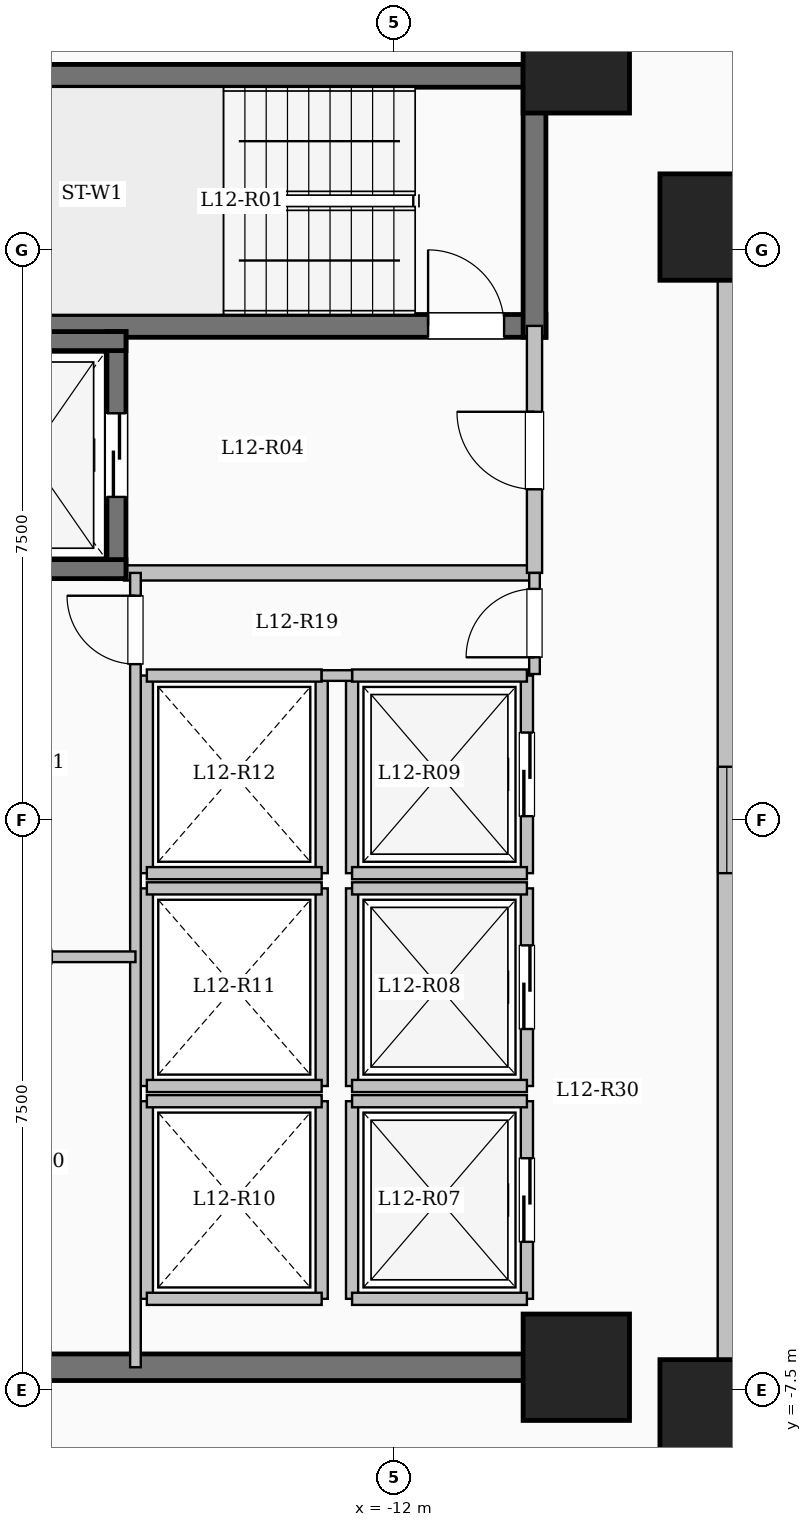
"""IFC4 building model, lengths in metres.
Left out: names, types, materials, properties, quantities, classifications, styles, units other than length and angle.
Written with IfcOpenShell. Run it as: python <this file> out.ifc"""

import sys

from ifc_helpers import new_model, si_unit, direction, frame, frame_2d, origin, origin_2d, place, context, subcontext, project, spatial, rectangle, extrude, element, fill, save


model = new_model("IFC4")
c1 = context("Model", 3, precision=1e-05, world=origin(), true_north=direction((0.0, 1.0)))
c2 = subcontext(c1, "Body", "Model", "MODEL_VIEW")
j1 = project(units=[si_unit("LENGTHUNIT", "METRE"), si_unit("PLANEANGLEUNIT", "RADIAN")], contexts=[c1])
p1 = place(None, origin())
s1 = spatial("IfcSite", under=j1, at=p1, CompositionType="ELEMENT")
p2 = place(p1, origin())
s2 = spatial("IfcBuilding", under=s1, at=p2, CompositionType="ELEMENT")
p3 = place(p2, frame((0.0, 0.0, 47.45)))
s3 = spatial("IfcBuildingStorey", under=s2, at=p3, CompositionType="ELEMENT", Elevation=47.45)
for number, where, z_axis, x_axis in (
    (1, (-7.8, -7.8, 0.0), (0.0, 0.0, 1.0), (1.0, 0.0, 0.0)),
    (2, (-7.8, 7.8, 0.0), (0.0, 0.0, 1.0), (1.0, 0.0, 0.0)),
    (3, (-9.6, -7.2, 0.0), (0.0, 0.0, 1.0), (1.0, 0.0, 0.0)),
    (4, (-9.6, 10.0, 0.0), (0.0, 0.0, 1.0), (1.0, 0.0, 0.0)),
):
    element("IfcColumn", number, at=place(p3, frame(where, z_axis=z_axis, x_axis=x_axis)), inside=s3, PredefinedType="COLUMN", context=c2, shape_type="SweptSolid", body=[
        extrude(rectangle(XDim=1.4, YDim=1.4, at=origin_2d()), origin(), (0.0, 0.0, 1.0), 3.35),
    ])
p4 = place(p3, frame((-7.62, -7.62, 0.0), z_axis=(0.0, 0.0, 1.0), x_axis=(1.0, 0.0, 0.0)))
e5 = element("IfcWall", 5, at=p4, inside=s3, PredefinedType="SOLIDWALL", context=c2, shape_type="SweptSolid", body=[
    extrude(rectangle(XDim=15.24, YDim=0.24, at=frame_2d((7.62, 0.0))), origin(), (0.0, 0.0, 1.0), 3.1),
])
p5 = place(p4, frame((6.92, 0.0, 0.95)))
e6 = element("IfcOpeningElement", 6, at=p5, cuts=e5, PredefinedType="OPENING", context=c2, shape_type="SweptSolid", body=[
    extrude(rectangle(XDim=1.4, YDim=1.5, at=frame_2d((0.7, 0.75))), frame((0.0, 0.13, 0.0), z_axis=(0.0, -1.0, 0.0), x_axis=(1.0, 0.0, 0.0)), (0.0, 0.0, 1.0), 0.26),
])
p6 = place(p3, frame((7.62, 7.62, 0.0), z_axis=(0.0, 0.0, 1.0), x_axis=(-1.0, 0.0, 0.0)))
e7 = element("IfcWall", 7, at=p6, inside=s3, PredefinedType="SOLIDWALL", context=c2, shape_type="SweptSolid", body=[
    extrude(rectangle(XDim=15.24, YDim=0.24, at=frame_2d((7.62, 0.0))), origin(), (0.0, 0.0, 1.0), 3.1),
])
p7 = place(p6, frame((6.92, 0.0, 0.95)))
e8 = element("IfcOpeningElement", 8, at=p7, cuts=e7, PredefinedType="OPENING", context=c2, shape_type="SweptSolid", body=[
    extrude(rectangle(XDim=1.4, YDim=1.5, at=frame_2d((0.7, 0.75))), frame((0.0, 0.13, 0.0), z_axis=(0.0, -1.0, 0.0), x_axis=(1.0, 0.0, 0.0)), (0.0, 0.0, 1.0), 0.26),
])
p8 = place(p3, frame((-7.62, 7.62, 0.0), z_axis=(0.0, 0.0, 1.0), x_axis=(0.0, -1.0, 0.0)))
e9 = element("IfcWall", 9, at=p8, inside=s3, PredefinedType="SOLIDWALL", context=c2, shape_type="SweptSolid", body=[
    extrude(rectangle(XDim=15.24, YDim=0.24, at=frame_2d((7.62, 0.0))), origin(), (0.0, 0.0, 1.0), 3.1),
])
p9 = place(p8, frame((6.92, 0.0, 0.95)))
e10 = element("IfcOpeningElement", 10, at=p9, cuts=e9, PredefinedType="OPENING", context=c2, shape_type="SweptSolid", body=[
    extrude(rectangle(XDim=1.4, YDim=1.5, at=frame_2d((0.7, 0.75))), frame((0.0, 0.13, 0.0), z_axis=(0.0, -1.0, 0.0), x_axis=(1.0, 0.0, 0.0)), (0.0, 0.0, 1.0), 0.26),
])
p10 = place(p3, frame((-18.0, 9.79, 0.0), z_axis=(0.0, 0.0, 1.0), x_axis=(1.0, 0.0, 0.0)))
e11 = element("IfcWall", 11, at=p10, inside=s3, PredefinedType="SHEAR", context=c2, shape_type="SweptSolid", body=[
    extrude(rectangle(XDim=8.0, YDim=0.3, at=frame_2d((4.0, 0.0))), origin(), (0.0, 0.0, 1.0), 3.35),
])
p11 = place(p3, frame((-18.0, 6.5, 0.0), z_axis=(0.0, 0.0, 1.0), x_axis=(1.0, 0.0, 0.0)))
e12 = element("IfcWall", 12, at=p11, inside=s3, PredefinedType="SHEAR", context=c2, shape_type="SweptSolid", body=[
    extrude(rectangle(XDim=8.0, YDim=0.3, at=frame_2d((4.0, 0.0))), origin(), (0.0, 0.0, 1.0), 3.35),
])
p12 = place(p11, frame((6.45, 0.0, 0.0)))
e13 = element("IfcOpeningElement", 13, at=p12, cuts=e12, PredefinedType="OPENING", context=c2, shape_type="SweptSolid", body=[
    extrude(rectangle(XDim=1.0, YDim=2.15, at=frame_2d((0.5, 1.075))), frame((0.0, 0.16, 0.0), z_axis=(0.0, -1.0, 0.0), x_axis=(1.0, 0.0, 0.0)), (0.0, 0.0, 1.0), 0.32),
])
p13 = place(p3, frame((-10.15, 6.35, 0.0), z_axis=(0.0, 0.0, 1.0), x_axis=(0.0, 1.0, 0.0)))
e14 = element("IfcWall", 14, at=p13, inside=s3, PredefinedType="SHEAR", context=c2, shape_type="SweptSolid", body=[
    extrude(rectangle(XDim=3.59, YDim=0.3, at=frame_2d((1.795, 0.0))), origin(), (0.0, 0.0, 1.0), 3.35),
])
p14 = place(p3, frame((-15.55, 3.25, 0.0), z_axis=(0.0, 0.0, 1.0), x_axis=(1.0, 0.0, 0.0)))
e15 = element("IfcWall", 15, at=p14, inside=s3, PredefinedType="SOLIDWALL", context=c2, shape_type="SweptSolid", body=[
    extrude(rectangle(XDim=5.4, YDim=0.2, at=frame_2d((2.7, 0.0))), origin(), (0.0, 0.0, 1.0), 3.1),
])
p15 = place(p3, frame((-10.15, 3.25, 0.0), z_axis=(0.0, 0.0, 1.0), x_axis=(0.0, 1.0, 0.0)))
e16 = element("IfcWall", 16, at=p15, inside=s3, PredefinedType="SOLIDWALL", context=c2, shape_type="SweptSolid", body=[
    extrude(rectangle(XDim=3.25, YDim=0.2, at=frame_2d((1.625, 0.0))), origin(), (0.0, 0.0, 1.0), 3.1),
])
p16 = place(p15, frame((1.1, 0.0, 0.0)))
e17 = element("IfcOpeningElement", 17, at=p16, cuts=e16, PredefinedType="OPENING", context=c2, shape_type="SweptSolid", body=[
    extrude(rectangle(XDim=1.02, YDim=2.15, at=frame_2d((0.51, 1.075))), frame((0.0, 0.11, 0.0), z_axis=(0.0, -1.0, 0.0), x_axis=(1.0, 0.0, 0.0)), (0.0, 0.0, 1.0), 0.22),
])
p17 = place(p3, frame((-15.65, 3.175, 0.0), z_axis=(0.0, 0.0, 1.0), x_axis=(0.0, 1.0, 0.0)))
e18 = element("IfcWall", 18, at=p17, inside=s3, PredefinedType="SHEAR", context=c2, shape_type="SweptSolid", body=[
    extrude(rectangle(XDim=3.25, YDim=0.25, at=frame_2d((1.625, 0.0))), origin(), (0.0, 0.0, 1.0), 3.35),
])
p18 = place(p17, frame((1.075, 0.0, 0.0)))
e19 = element("IfcOpeningElement", 19, at=p18, cuts=e18, PredefinedType="OPENING", context=c2, shape_type="SweptSolid", body=[
    extrude(rectangle(XDim=1.1, YDim=2.15, at=frame_2d((0.55, 1.075))), frame((0.0, 0.135, 0.0), z_axis=(0.0, -1.0, 0.0), x_axis=(1.0, 0.0, 0.0)), (0.0, 0.0, 1.0), 0.27),
])
for number, where, z_axis, x_axis in (
    (20, (-18.075, 3.3, 0.0), (0.0, 0.0, 1.0), (1.0, 0.0, 0.0)),
    (21, (-18.075, 6.3, 0.0), (0.0, 0.0, 1.0), (1.0, 0.0, 0.0)),
):
    element("IfcWall", number, at=place(p3, frame(where, z_axis=z_axis, x_axis=x_axis)), inside=s3, PredefinedType="SHEAR", context=c2, shape_type="SweptSolid", body=[
        extrude(rectangle(XDim=2.55, YDim=0.25, at=frame_2d((1.275, 0.0))), origin(), (0.0, 0.0, 1.0), 3.35),
    ])
p19 = place(p3, frame((-12.55, -6.3, 0.0), z_axis=(0.0, 0.0, 1.0), x_axis=(0.0, 1.0, 0.0)))
e22 = element("IfcWall", 22, at=p19, inside=s3, PredefinedType="SOLIDWALL", context=c2, shape_type="SweptSolid", body=[
    extrude(rectangle(XDim=2.6, YDim=0.16, at=frame_2d((1.3, 0.0))), origin(), (0.0, 0.0, 1.0), 3.1),
])
p20 = place(p3, frame((-10.25, -6.3, 0.0), z_axis=(0.0, 0.0, 1.0), x_axis=(0.0, 1.0, 0.0)))
e23 = element("IfcWall", 23, at=p20, inside=s3, PredefinedType="SOLIDWALL", context=c2, shape_type="SweptSolid", body=[
    extrude(rectangle(XDim=2.6, YDim=0.16, at=frame_2d((1.3, 0.0))), origin(), (0.0, 0.0, 1.0), 3.1),
])
p21 = place(p20, frame((0.75, 0.0, 0.0)))
e24 = element("IfcOpeningElement", 24, at=p21, cuts=e23, PredefinedType="OPENING", context=c2, shape_type="SweptSolid", body=[
    extrude(rectangle(XDim=1.1, YDim=2.15, at=frame_2d((0.55, 1.075))), frame((0.0, 0.09, 0.0), z_axis=(0.0, -1.0, 0.0), x_axis=(1.0, 0.0, 0.0)), (0.0, 0.0, 1.0), 0.18),
])
for number, where, z_axis, x_axis in (
    (25, (-12.55, -6.3, 0.0), (0.0, 0.0, 1.0), (1.0, 0.0, 0.0)),
    (26, (-12.55, -3.7, 0.0), (0.0, 0.0, 1.0), (1.0, 0.0, 0.0)),
):
    element("IfcWall", number, at=place(p3, frame(where, z_axis=z_axis, x_axis=x_axis)), inside=s3, PredefinedType="SOLIDWALL", context=c2, shape_type="SweptSolid", body=[
        extrude(rectangle(XDim=2.3, YDim=0.16, at=frame_2d((1.15, 0.0))), origin(), (0.0, 0.0, 1.0), 3.1),
    ])
p22 = place(p3, frame((-12.55, -3.5, 0.0), z_axis=(0.0, 0.0, 1.0), x_axis=(0.0, 1.0, 0.0)))
e27 = element("IfcWall", 27, at=p22, inside=s3, PredefinedType="SOLIDWALL", context=c2, shape_type="SweptSolid", body=[
    extrude(rectangle(XDim=2.6, YDim=0.16, at=frame_2d((1.3, 0.0))), origin(), (0.0, 0.0, 1.0), 3.1),
])
p23 = place(p3, frame((-10.25, -3.5, 0.0), z_axis=(0.0, 0.0, 1.0), x_axis=(0.0, 1.0, 0.0)))
e28 = element("IfcWall", 28, at=p23, inside=s3, PredefinedType="SOLIDWALL", context=c2, shape_type="SweptSolid", body=[
    extrude(rectangle(XDim=2.6, YDim=0.16, at=frame_2d((1.3, 0.0))), origin(), (0.0, 0.0, 1.0), 3.1),
])
p24 = place(p23, frame((0.75, 0.0, 0.0)))
e29 = element("IfcOpeningElement", 29, at=p24, cuts=e28, PredefinedType="OPENING", context=c2, shape_type="SweptSolid", body=[
    extrude(rectangle(XDim=1.1, YDim=2.15, at=frame_2d((0.55, 1.075))), frame((0.0, 0.09, 0.0), z_axis=(0.0, -1.0, 0.0), x_axis=(1.0, 0.0, 0.0)), (0.0, 0.0, 1.0), 0.18),
])
for number, where, z_axis, x_axis in (
    (30, (-12.55, -3.5, 0.0), (0.0, 0.0, 1.0), (1.0, 0.0, 0.0)),
    (31, (-12.55, -0.9, 0.0), (0.0, 0.0, 1.0), (1.0, 0.0, 0.0)),
):
    element("IfcWall", number, at=place(p3, frame(where, z_axis=z_axis, x_axis=x_axis)), inside=s3, PredefinedType="SOLIDWALL", context=c2, shape_type="SweptSolid", body=[
        extrude(rectangle(XDim=2.3, YDim=0.16, at=frame_2d((1.15, 0.0))), origin(), (0.0, 0.0, 1.0), 3.1),
    ])
p25 = place(p3, frame((-12.55, -0.7, 0.0), z_axis=(0.0, 0.0, 1.0), x_axis=(0.0, 1.0, 0.0)))
e32 = element("IfcWall", 32, at=p25, inside=s3, PredefinedType="SOLIDWALL", context=c2, shape_type="SweptSolid", body=[
    extrude(rectangle(XDim=2.6, YDim=0.16, at=frame_2d((1.3, 0.0))), origin(), (0.0, 0.0, 1.0), 3.1),
])
p26 = place(p3, frame((-10.25, -0.7, 0.0), z_axis=(0.0, 0.0, 1.0), x_axis=(0.0, 1.0, 0.0)))
e33 = element("IfcWall", 33, at=p26, inside=s3, PredefinedType="SOLIDWALL", context=c2, shape_type="SweptSolid", body=[
    extrude(rectangle(XDim=2.6, YDim=0.16, at=frame_2d((1.3, 0.0))), origin(), (0.0, 0.0, 1.0), 3.1),
])
p27 = place(p26, frame((0.75, 0.0, 0.0)))
e34 = element("IfcOpeningElement", 34, at=p27, cuts=e33, PredefinedType="OPENING", context=c2, shape_type="SweptSolid", body=[
    extrude(rectangle(XDim=1.1, YDim=2.15, at=frame_2d((0.55, 1.075))), frame((0.0, 0.09, 0.0), z_axis=(0.0, -1.0, 0.0), x_axis=(1.0, 0.0, 0.0)), (0.0, 0.0, 1.0), 0.18),
])
for number, where, z_axis, x_axis in (
    (35, (-12.55, -0.7, 0.0), (0.0, 0.0, 1.0), (1.0, 0.0, 0.0)),
    (36, (-12.55, 1.9, 0.0), (0.0, 0.0, 1.0), (1.0, 0.0, 0.0)),
):
    element("IfcWall", number, at=place(p3, frame(where, z_axis=z_axis, x_axis=x_axis)), inside=s3, PredefinedType="SOLIDWALL", context=c2, shape_type="SweptSolid", body=[
        extrude(rectangle(XDim=2.3, YDim=0.16, at=frame_2d((1.15, 0.0))), origin(), (0.0, 0.0, 1.0), 3.1),
    ])
for number, where, z_axis, x_axis in (
    (37, (-15.25, -6.3, 0.0), (0.0, 0.0, 1.0), (0.0, 1.0, 0.0)),
    (38, (-12.95, -6.3, 0.0), (0.0, 0.0, 1.0), (0.0, 1.0, 0.0)),
):
    element("IfcWall", number, at=place(p3, frame(where, z_axis=z_axis, x_axis=x_axis)), inside=s3, PredefinedType="SOLIDWALL", context=c2, shape_type="SweptSolid", body=[
        extrude(rectangle(XDim=2.6, YDim=0.16, at=frame_2d((1.3, 0.0))), origin(), (0.0, 0.0, 1.0), 3.1),
    ])
for number, where, z_axis, x_axis in (
    (39, (-15.25, -6.3, 0.0), (0.0, 0.0, 1.0), (1.0, 0.0, 0.0)),
    (40, (-15.25, -3.7, 0.0), (0.0, 0.0, 1.0), (1.0, 0.0, 0.0)),
):
    element("IfcWall", number, at=place(p3, frame(where, z_axis=z_axis, x_axis=x_axis)), inside=s3, PredefinedType="SOLIDWALL", context=c2, shape_type="SweptSolid", body=[
        extrude(rectangle(XDim=2.3, YDim=0.16, at=frame_2d((1.15, 0.0))), origin(), (0.0, 0.0, 1.0), 3.1),
    ])
for number, where, z_axis, x_axis in (
    (41, (-15.25, -3.5, 0.0), (0.0, 0.0, 1.0), (0.0, 1.0, 0.0)),
    (42, (-12.95, -3.5, 0.0), (0.0, 0.0, 1.0), (0.0, 1.0, 0.0)),
):
    element("IfcWall", number, at=place(p3, frame(where, z_axis=z_axis, x_axis=x_axis)), inside=s3, PredefinedType="SOLIDWALL", context=c2, shape_type="SweptSolid", body=[
        extrude(rectangle(XDim=2.6, YDim=0.16, at=frame_2d((1.3, 0.0))), origin(), (0.0, 0.0, 1.0), 3.1),
    ])
for number, where, z_axis, x_axis in (
    (43, (-15.25, -3.5, 0.0), (0.0, 0.0, 1.0), (1.0, 0.0, 0.0)),
    (44, (-15.25, -0.9, 0.0), (0.0, 0.0, 1.0), (1.0, 0.0, 0.0)),
):
    element("IfcWall", number, at=place(p3, frame(where, z_axis=z_axis, x_axis=x_axis)), inside=s3, PredefinedType="SOLIDWALL", context=c2, shape_type="SweptSolid", body=[
        extrude(rectangle(XDim=2.3, YDim=0.16, at=frame_2d((1.15, 0.0))), origin(), (0.0, 0.0, 1.0), 3.1),
    ])
for number, where, z_axis, x_axis in (
    (45, (-15.25, -0.7, 0.0), (0.0, 0.0, 1.0), (0.0, 1.0, 0.0)),
    (46, (-12.95, -0.7, 0.0), (0.0, 0.0, 1.0), (0.0, 1.0, 0.0)),
):
    element("IfcWall", number, at=place(p3, frame(where, z_axis=z_axis, x_axis=x_axis)), inside=s3, PredefinedType="SOLIDWALL", context=c2, shape_type="SweptSolid", body=[
        extrude(rectangle(XDim=2.6, YDim=0.16, at=frame_2d((1.3, 0.0))), origin(), (0.0, 0.0, 1.0), 3.1),
    ])
for number, where, z_axis, x_axis in (
    (47, (-15.25, -0.7, 0.0), (0.0, 0.0, 1.0), (1.0, 0.0, 0.0)),
    (48, (-15.25, 1.9, 0.0), (0.0, 0.0, 1.0), (1.0, 0.0, 0.0)),
):
    element("IfcWall", number, at=place(p3, frame(where, z_axis=z_axis, x_axis=x_axis)), inside=s3, PredefinedType="SOLIDWALL", context=c2, shape_type="SweptSolid", body=[
        extrude(rectangle(XDim=2.3, YDim=0.16, at=frame_2d((1.15, 0.0))), origin(), (0.0, 0.0, 1.0), 3.1),
    ])
p28 = place(p3, frame((-18.625, -7.2, 0.0), z_axis=(0.0, 0.0, 1.0), x_axis=(1.0, 0.0, 0.0)))
e49 = element("IfcWall", 49, at=p28, inside=s3, PredefinedType="SHEAR", context=c2, shape_type="SweptSolid", body=[
    extrude(rectangle(XDim=8.55, YDim=0.35, at=frame_2d((4.275, 0.0))), origin(), (0.0, 0.0, 1.0), 3.35),
])
p29 = place(p3, frame((-12.95, 1.9, 0.0), z_axis=(0.0, 0.0, 1.0), x_axis=(1.0, 0.0, 0.0)))
e50 = element("IfcWall", 50, at=p29, inside=s3, PredefinedType="PARTITIONING", context=c2, shape_type="SweptSolid", body=[
    extrude(rectangle(XDim=0.4, YDim=0.14, at=frame_2d((0.2, 0.0))), origin(), (0.0, 0.0, 1.0), 3.1),
])
p30 = place(p3, frame((-10.15, 1.92, 0.0), z_axis=(0.0, 0.0, 1.0), x_axis=(0.0, 1.0, 0.0)))
e51 = element("IfcWall", 51, at=p30, inside=s3, PredefinedType="PARTITIONING", context=c2, shape_type="SweptSolid", body=[
    extrude(rectangle(XDim=1.33, YDim=0.14, at=frame_2d((0.665, 0.0))), origin(), (0.0, 0.0, 1.0), 3.1),
])
p31 = place(p30, frame((0.22, 0.0, 0.0)))
e52 = element("IfcOpeningElement", 52, at=p31, cuts=e51, PredefinedType="OPENING", context=c2, shape_type="SweptSolid", body=[
    extrude(rectangle(XDim=0.9, YDim=2.08, at=frame_2d((0.45, 1.04))), frame((0.0, 0.08, 0.0), z_axis=(0.0, -1.0, 0.0), x_axis=(1.0, 0.0, 0.0)), (0.0, 0.0, 1.0), 0.16),
])
p32 = place(p3, frame((-15.4, -7.2, 0.0), z_axis=(0.0, 0.0, 1.0), x_axis=(0.0, 1.0, 0.0)))
e53 = element("IfcWall", 53, at=p32, inside=s3, PredefinedType="PARTITIONING", context=c2, shape_type="SweptSolid", body=[
    extrude(rectangle(XDim=10.45, YDim=0.14, at=frame_2d((5.225, 0.0))), origin(), (0.0, 0.0, 1.0), 3.1),
])
p33 = place(p32, frame((9.25, 0.0, 0.0)))
e54 = element("IfcOpeningElement", 54, at=p33, cuts=e53, PredefinedType="OPENING", context=c2, shape_type="SweptSolid", body=[
    extrude(rectangle(XDim=0.9, YDim=2.08, at=frame_2d((0.45, 1.04))), frame((0.0, 0.08, 0.0), z_axis=(0.0, -1.0, 0.0), x_axis=(1.0, 0.0, 0.0)), (0.0, 0.0, 1.0), 0.16),
])
p34 = place(p3, frame((-18.45, -1.8, 0.0), z_axis=(0.0, 0.0, 1.0), x_axis=(1.0, 0.0, 0.0)))
e55 = element("IfcWall", 55, at=p34, inside=s3, PredefinedType="PARTITIONING", context=c2, shape_type="SweptSolid", body=[
    extrude(rectangle(XDim=3.05, YDim=0.14, at=frame_2d((1.525, 0.0))), origin(), (0.0, 0.0, 1.0), 3.1),
])
p35 = place(p34, frame((1.05, 0.0, 0.0)))
e56 = element("IfcOpeningElement", 56, at=p35, cuts=e55, PredefinedType="OPENING", context=c2, shape_type="SweptSolid", body=[
    extrude(rectangle(XDim=0.9, YDim=2.08, at=frame_2d((0.45, 1.04))), frame((0.0, 0.08, 0.0), z_axis=(0.0, -1.0, 0.0), x_axis=(1.0, 0.0, 0.0)), (0.0, 0.0, 1.0), 0.16),
])
p36 = place(p9, origin())
e57 = element("IfcWindow", 57, at=p36, inside=s3, PartitioningType="SINGLE_PANEL", PredefinedType="WINDOW", context=c2, shape_type="SweptSolid", body=[
    extrude(rectangle(XDim=1.4, YDim=1.5, at=frame_2d((0.7, 0.75))), frame((0.0, 0.03, 0.0), z_axis=(0.0, -1.0, 0.0), x_axis=(1.0, 0.0, 0.0)), (0.0, 0.0, 1.0), 0.06),
])
fill(e10, e57)
p37 = place(p12, origin())
e58 = element("IfcDoor", 58, at=p37, inside=s3, OperationType="SINGLE_SWING_LEFT", PredefinedType="DOOR", context=c2, shape_type="SweptSolid", body=[
    extrude(rectangle(XDim=1.0, YDim=2.15, at=frame_2d((0.5, 1.075))), frame((0.0, 0.025, 0.0), z_axis=(0.0, -1.0, 0.0), x_axis=(1.0, 0.0, 0.0)), (0.0, 0.0, 1.0), 0.05),
])
fill(e13, e58)
p38 = place(p16, origin())
e59 = element("IfcDoor", 59, at=p38, inside=s3, OperationType="SINGLE_SWING_RIGHT", PredefinedType="DOOR", context=c2, shape_type="SweptSolid", body=[
    extrude(rectangle(XDim=1.02, YDim=2.15, at=frame_2d((0.51, 1.075))), frame((0.0, 0.025, 0.0), z_axis=(0.0, -1.0, 0.0), x_axis=(1.0, 0.0, 0.0)), (0.0, 0.0, 1.0), 0.05),
])
fill(e17, e59)
p39 = place(p18, origin())
e60 = element("IfcDoor", 60, at=p39, inside=s3, OperationType="SLIDING_TO_LEFT", PredefinedType="DOOR", context=c2, shape_type="SweptSolid", body=[
    extrude(rectangle(XDim=1.1, YDim=2.15, at=frame_2d((0.55, 1.075))), frame((0.0, 0.025, 0.0), z_axis=(0.0, -1.0, 0.0), x_axis=(1.0, 0.0, 0.0)), (0.0, 0.0, 1.0), 0.05),
])
fill(e19, e60)
p40 = place(p21, origin())
e61 = element("IfcDoor", 61, at=p40, inside=s3, OperationType="SLIDING_TO_LEFT", PredefinedType="DOOR", context=c2, shape_type="SweptSolid", body=[
    extrude(rectangle(XDim=1.1, YDim=2.15, at=frame_2d((0.55, 1.075))), frame((0.0, 0.025, 0.0), z_axis=(0.0, -1.0, 0.0), x_axis=(1.0, 0.0, 0.0)), (0.0, 0.0, 1.0), 0.05),
])
fill(e24, e61)
p41 = place(p24, origin())
e62 = element("IfcDoor", 62, at=p41, inside=s3, OperationType="SLIDING_TO_LEFT", PredefinedType="DOOR", context=c2, shape_type="SweptSolid", body=[
    extrude(rectangle(XDim=1.1, YDim=2.15, at=frame_2d((0.55, 1.075))), frame((0.0, 0.025, 0.0), z_axis=(0.0, -1.0, 0.0), x_axis=(1.0, 0.0, 0.0)), (0.0, 0.0, 1.0), 0.05),
])
fill(e29, e62)
p42 = place(p27, origin())
e63 = element("IfcDoor", 63, at=p42, inside=s3, OperationType="SLIDING_TO_LEFT", PredefinedType="DOOR", context=c2, shape_type="SweptSolid", body=[
    extrude(rectangle(XDim=1.1, YDim=2.15, at=frame_2d((0.55, 1.075))), frame((0.0, 0.025, 0.0), z_axis=(0.0, -1.0, 0.0), x_axis=(1.0, 0.0, 0.0)), (0.0, 0.0, 1.0), 0.05),
])
fill(e34, e63)
p43 = place(p31, origin())
e64 = element("IfcDoor", 64, at=p43, inside=s3, OperationType="SINGLE_SWING_LEFT", PredefinedType="DOOR", context=c2, shape_type="SweptSolid", body=[
    extrude(rectangle(XDim=0.9, YDim=2.08, at=frame_2d((0.45, 1.04))), frame((0.0, 0.025, 0.0), z_axis=(0.0, -1.0, 0.0), x_axis=(1.0, 0.0, 0.0)), (0.0, 0.0, 1.0), 0.05),
])
fill(e52, e64)
p44 = place(p33, origin())
e65 = element("IfcDoor", 65, at=p44, inside=s3, OperationType="SINGLE_SWING_RIGHT", PredefinedType="DOOR", context=c2, shape_type="SweptSolid", body=[
    extrude(rectangle(XDim=0.9, YDim=2.08, at=frame_2d((0.45, 1.04))), frame((0.0, 0.025, 0.0), z_axis=(0.0, -1.0, 0.0), x_axis=(1.0, 0.0, 0.0)), (0.0, 0.0, 1.0), 0.05),
])
fill(e54, e65)
save(model, sys.argv[1])
